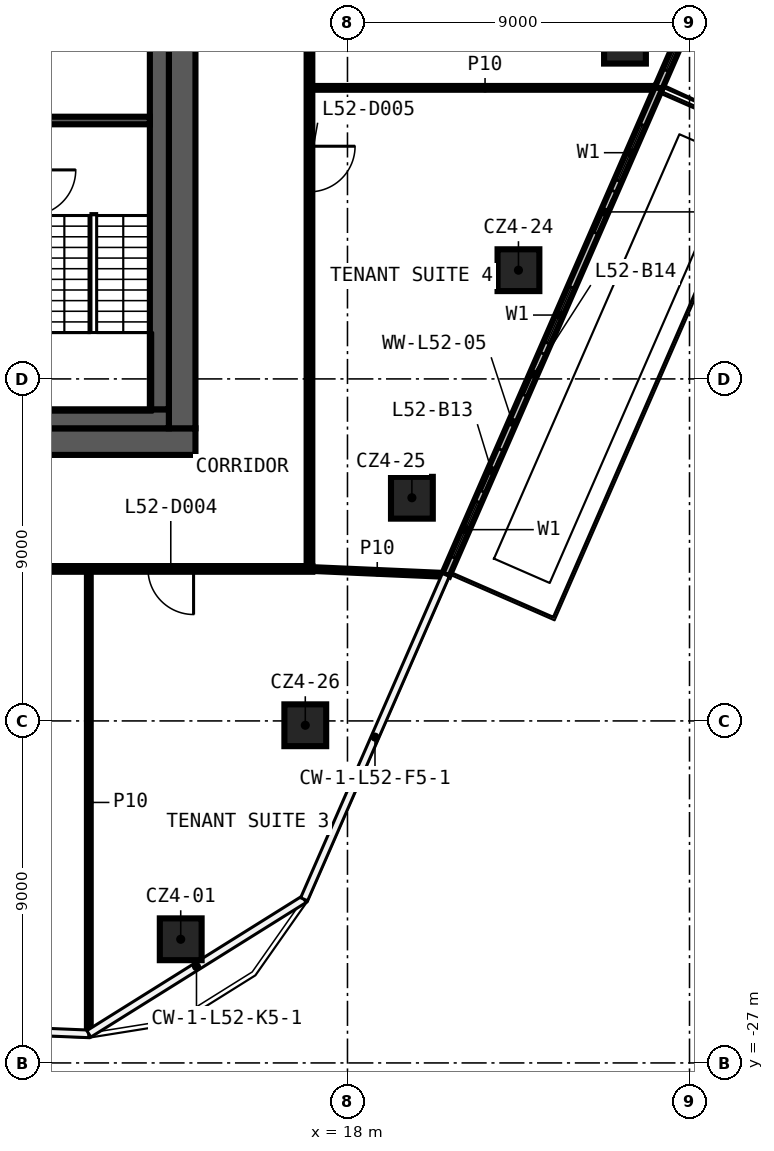
"""IFC4 building model, lengths in metres.
Left out: names, types, materials, properties, quantities, classifications, styles, units other than length and angle.
Written with IfcOpenShell. Run it as: python <this file> out.ifc"""

import sys

from ifc_helpers import new_model, si_unit, direction, frame, frame_2d, origin, origin_2d, place, context, subcontext, project, spatial, rectangle, extrude, element, fill, save


model = new_model("IFC4")
c1 = context("Model", 3, precision=1e-05, world=origin(), true_north=direction((0.0, 1.0)))
c2 = subcontext(c1, "Body", "Model", "MODEL_VIEW")
j1 = project(units=[si_unit("LENGTHUNIT", "METRE"), si_unit("PLANEANGLEUNIT", "RADIAN")], contexts=[c1])
p1 = place(None, origin())
s1 = spatial("IfcSite", under=j1, at=p1, CompositionType="ELEMENT")
p2 = place(p1, origin())
s2 = spatial("IfcBuilding", under=s1, at=p2, CompositionType="ELEMENT")
p3 = place(p2, frame((0.0, 0.0, 249.6)))
s3 = spatial("IfcBuildingStorey", under=s2, at=p3, CompositionType="ELEMENT", Elevation=249.6)
for number, where, z_axis, x_axis in (
    (1, (13.612, -23.746, 0.0), (0.0, 0.0, 1.0), (1.0, 0.0, 0.0)),
    (2, (25.302, -0.152, 0.0), (0.0, 0.0, 1.0), (1.0, 0.0, 0.0)),
    (3, (22.499, -6.139, 0.0), (0.0, 0.0, 1.0), (1.0, 0.0, 0.0)),
    (4, (19.695, -12.127, 0.0), (0.0, 0.0, 1.0), (1.0, 0.0, 0.0)),
    (5, (16.89, -18.114, 0.0), (0.0, 0.0, 1.0), (1.0, 0.0, 0.0)),
):
    element("IfcColumn", number, at=place(p3, frame(where, z_axis=z_axis, x_axis=x_axis)), inside=s3, PredefinedType="COLUMN", context=c2, shape_type="SweptSolid", body=[
        extrude(rectangle(XDim=1.1, YDim=1.1, at=origin_2d()), origin(), (0.0, 0.0, 1.0), 3.82),
    ])
p4 = place(p3, frame((17.075, -14.0, 0.0), z_axis=(0.0, 0.0, 1.0), x_axis=(-1.0, 0.0, 0.0)))
e6 = element("IfcWall", 6, at=p4, inside=s3, PredefinedType="PARTITIONING", context=c2, shape_type="SweptSolid", body=[
    extrude(rectangle(XDim=26.15, YDim=0.15, at=frame_2d((13.075, 0.0))), origin(), (0.0, 0.0, 1.0), 3.82),
])
p5 = place(p4, frame((23.476, 0.0, 0.0)))
e7 = element("IfcOpeningElement", 7, at=p5, cuts=e6, PredefinedType="OPENING", context=c2, shape_type="SweptSolid", body=[
    extrude(rectangle(XDim=1.2, YDim=2.1, at=frame_2d((0.6, 1.05))), frame((0.0, 0.085, 0.0), z_axis=(0.0, -1.0, 0.0), x_axis=(1.0, 0.0, 0.0)), (0.0, 0.0, 1.0), 0.17),
])
p6 = place(p4, frame((19.452, 0.0, 0.0)))
e8 = element("IfcOpeningElement", 8, at=p6, cuts=e6, PredefinedType="OPENING", context=c2, shape_type="SweptSolid", body=[
    extrude(rectangle(XDim=1.2, YDim=2.1, at=frame_2d((0.6, 1.05))), frame((0.0, 0.085, 0.0), z_axis=(0.0, -1.0, 0.0), x_axis=(1.0, 0.0, 0.0)), (0.0, 0.0, 1.0), 0.17),
])
p7 = place(p4, frame((11.351, 0.0, 0.0)))
e9 = element("IfcOpeningElement", 9, at=p7, cuts=e6, PredefinedType="OPENING", context=c2, shape_type="SweptSolid", body=[
    extrude(rectangle(XDim=1.2, YDim=2.1, at=frame_2d((0.6, 1.05))), frame((0.0, 0.085, 0.0), z_axis=(0.0, -1.0, 0.0), x_axis=(1.0, 0.0, 0.0)), (0.0, 0.0, 1.0), 0.17),
])
p8 = place(p4, frame((3.125, 0.0, 0.0)))
e10 = element("IfcOpeningElement", 10, at=p8, cuts=e6, PredefinedType="OPENING", context=c2, shape_type="SweptSolid", body=[
    extrude(rectangle(XDim=1.2, YDim=2.1, at=frame_2d((0.6, 1.05))), frame((0.0, 0.085, 0.0), z_axis=(0.0, -1.0, 0.0), x_axis=(1.0, 0.0, 0.0)), (0.0, 0.0, 1.0), 0.17),
])
p9 = place(p3, frame((17.075, -1.341, 0.0), z_axis=(0.0, 0.0, 1.0), x_axis=(1.0, 0.0, 0.0)))
e11 = element("IfcWall", 11, at=p9, inside=s3, PredefinedType="PARTITIONING", context=c2, shape_type="SweptSolid", body=[
    extrude(rectangle(XDim=9.09, YDim=0.1, at=frame_2d((4.545, 0.0))), origin(), (0.0, 0.0, 1.0), 3.82),
])
p10 = place(p3, frame((17.0, 13.925, 0.0), z_axis=(0.0, 0.0, 1.0), x_axis=(0.0, -1.0, 0.0)))
e12 = element("IfcWall", 12, at=p10, inside=s3, PredefinedType="PARTITIONING", context=c2, shape_type="SweptSolid", body=[
    extrude(rectangle(XDim=27.85, YDim=0.15, at=frame_2d((13.925, 0.0))), origin(), (0.0, 0.0, 1.0), 3.82),
])
p11 = place(p10, frame((16.802, 0.0, 0.0)))
e13 = element("IfcOpeningElement", 13, at=p11, cuts=e12, PredefinedType="OPENING", context=c2, shape_type="SweptSolid", body=[
    extrude(rectangle(XDim=1.2, YDim=2.1, at=frame_2d((0.6, 1.05))), frame((0.0, 0.085, 0.0), z_axis=(0.0, -1.0, 0.0), x_axis=(1.0, 0.0, 0.0)), (0.0, 0.0, 1.0), 0.17),
])
p12 = place(p10, frame((12.534, 0.0, 0.0)))
e14 = element("IfcOpeningElement", 14, at=p12, cuts=e12, PredefinedType="OPENING", context=c2, shape_type="SweptSolid", body=[
    extrude(rectangle(XDim=1.2, YDim=2.1, at=frame_2d((0.6, 1.05))), frame((0.0, 0.085, 0.0), z_axis=(0.0, -1.0, 0.0), x_axis=(1.0, 0.0, 0.0)), (0.0, 0.0, 1.0), 0.17),
])
p13 = place(p3, frame((11.194, -26.215, 0.0), z_axis=(0.0, 0.0, 1.0), x_axis=(0.0, 1.0, 0.0)))
e15 = element("IfcWall", 15, at=p13, inside=s3, PredefinedType="PARTITIONING", context=c2, shape_type="SweptSolid", body=[
    extrude(rectangle(XDim=12.14, YDim=0.1, at=frame_2d((6.07, 0.0))), origin(), (0.0, 0.0, 1.0), 3.82),
])
p14 = place(p3, frame((17.0, -14.0, 0.0), z_axis=(0.0, 0.0, 1.0), x_axis=(0.99903279054, -0.043971393272, 0.0)))
e16 = element("IfcWall", 16, at=p14, inside=s3, PredefinedType="PARTITIONING", context=c2, shape_type="SweptSolid", body=[
    extrude(rectangle(XDim=3.57, YDim=0.1, at=frame_2d((1.785, 0.0))), origin(), (0.0, 0.0, 1.0), 3.82),
])
p15 = place(p3, frame((20.588, -14.158, 0.0), z_axis=(0.0, 0.0, 1.0), x_axis=(0.400286749381, 0.916389937892, 0.0)))
e17 = element("IfcWall", 17, at=p15, inside=s3, PredefinedType="SOLIDWALL", context=c2, shape_type="SweptSolid", body=[
    extrude(rectangle(XDim=13.987, YDim=0.2, at=frame_2d((6.993, 0.0))), origin(), (0.0, 0.0, 1.0), 3.82),
])
p16 = place(p15, frame((0.5, 0.0, 0.6)))
e18 = element("IfcOpeningElement", 18, at=p16, cuts=e17, PredefinedType="OPENING", context=c2, shape_type="SweptSolid", body=[
    extrude(rectangle(XDim=1.6, YDim=2.4, at=frame_2d((0.8, 1.2))), frame((0.0, 0.11, 0.0), z_axis=(0.0, -1.0, 0.0), x_axis=(1.0, 0.0, 0.0)), (0.0, 0.0, 1.0), 0.22),
])
p17 = place(p15, frame((2.4, 0.0, 0.0)))
e19 = element("IfcOpeningElement", 19, at=p17, cuts=e17, PredefinedType="OPENING", context=c2, shape_type="SweptSolid", body=[
    extrude(rectangle(XDim=1.2, YDim=2.4, at=frame_2d((0.6, 1.2))), frame((0.0, 0.11, 0.0), z_axis=(0.0, -1.0, 0.0), x_axis=(1.0, 0.0, 0.0)), (0.0, 0.0, 1.0), 0.22),
])
p18 = place(p15, frame((6.662, 0.0, 0.6)))
e20 = element("IfcOpeningElement", 20, at=p18, cuts=e17, PredefinedType="OPENING", context=c2, shape_type="SweptSolid", body=[
    extrude(rectangle(XDim=1.6, YDim=2.4, at=frame_2d((0.8, 1.2))), frame((0.0, 0.11, 0.0), z_axis=(0.0, -1.0, 0.0), x_axis=(1.0, 0.0, 0.0)), (0.0, 0.0, 1.0), 0.22),
])
p19 = place(p15, frame((5.162, 0.0, 0.0)))
e21 = element("IfcOpeningElement", 21, at=p19, cuts=e17, PredefinedType="OPENING", context=c2, shape_type="SweptSolid", body=[
    extrude(rectangle(XDim=1.2, YDim=2.4, at=frame_2d((0.6, 1.2))), frame((0.0, 0.11, 0.0), z_axis=(0.0, -1.0, 0.0), x_axis=(1.0, 0.0, 0.0)), (0.0, 0.0, 1.0), 0.22),
])
p20 = place(p15, frame((11.324, 0.0, 0.6)))
e22 = element("IfcOpeningElement", 22, at=p20, cuts=e17, PredefinedType="OPENING", context=c2, shape_type="SweptSolid", body=[
    extrude(rectangle(XDim=1.6, YDim=2.4, at=frame_2d((0.8, 1.2))), frame((0.0, 0.11, 0.0), z_axis=(0.0, -1.0, 0.0), x_axis=(1.0, 0.0, 0.0)), (0.0, 0.0, 1.0), 0.22),
])
p21 = place(p15, frame((9.824, 0.0, 0.0)))
e23 = element("IfcOpeningElement", 23, at=p21, cuts=e17, PredefinedType="OPENING", context=c2, shape_type="SweptSolid", body=[
    extrude(rectangle(XDim=1.2, YDim=2.4, at=frame_2d((0.6, 1.2))), frame((0.0, 0.11, 0.0), z_axis=(0.0, -1.0, 0.0), x_axis=(1.0, 0.0, 0.0)), (0.0, 0.0, 1.0), 0.22),
])
p22 = place(p3, frame((26.187, -1.341, 0.0), z_axis=(0.0, 0.0, 1.0), x_axis=(0.400293036608, 0.916387191553, 0.0)))
e24 = element("IfcWall", 24, at=p22, inside=s3, PredefinedType="SOLIDWALL", context=c2, shape_type="SweptSolid", body=[
    extrude(rectangle(XDim=4.653, YDim=0.2, at=frame_2d((2.327, 0.0))), origin(), (0.0, 0.0, 1.0), 3.82),
])
p23 = place(p22, frame((0.5, 0.0, 0.6)))
e25 = element("IfcOpeningElement", 25, at=p23, cuts=e24, PredefinedType="OPENING", context=c2, shape_type="SweptSolid", body=[
    extrude(rectangle(XDim=1.6, YDim=2.4, at=frame_2d((0.8, 1.2))), frame((0.0, 0.11, 0.0), z_axis=(0.0, -1.0, 0.0), x_axis=(1.0, 0.0, 0.0)), (0.0, 0.0, 1.0), 0.22),
])
p24 = place(p22, frame((2.4, 0.0, 0.0)))
e26 = element("IfcOpeningElement", 26, at=p24, cuts=e24, PredefinedType="OPENING", context=c2, shape_type="SweptSolid", body=[
    extrude(rectangle(XDim=1.2, YDim=2.4, at=frame_2d((0.6, 1.2))), frame((0.0, 0.11, 0.0), z_axis=(0.0, -1.0, 0.0), x_axis=(1.0, 0.0, 0.0)), (0.0, 0.0, 1.0), 0.22),
])
p25 = place(p3, frame((14.0, -10.65, 0.0), z_axis=(0.0, 0.0, 1.0), x_axis=(-1.0, 0.0, 0.0)))
e27 = element("IfcWall", 27, at=p25, inside=s3, PredefinedType="SHEAR", context=c2, shape_type="SweptSolid", body=[
    extrude(rectangle(XDim=28.0, YDim=0.7, at=frame_2d((14.0, 0.0))), origin(), (0.0, 0.0, 1.0), 3.82),
])
p26 = place(p25, frame((5.1, 0.0, 0.0)))
e28 = element("IfcOpeningElement", 28, at=p26, cuts=e27, PredefinedType="OPENING", context=c2, shape_type="SweptSolid", body=[
    extrude(rectangle(XDim=1.6, YDim=2.1, at=frame_2d((0.8, 1.05))), frame((0.0, 0.36, 0.0), z_axis=(0.0, -1.0, 0.0), x_axis=(1.0, 0.0, 0.0)), (0.0, 0.0, 1.0), 0.72),
])
p27 = place(p3, frame((13.65, 10.3, 0.0), z_axis=(0.0, 0.0, 1.0), x_axis=(0.0, -1.0, 0.0)))
e29 = element("IfcWall", 29, at=p27, inside=s3, PredefinedType="SHEAR", context=c2, shape_type="SweptSolid", body=[
    extrude(rectangle(XDim=20.6, YDim=0.7, at=frame_2d((10.3, 0.0))), origin(), (0.0, 0.0, 1.0), 3.82),
])
p28 = place(p3, frame((13.3, -10.05, 0.0), z_axis=(0.0, 0.0, 1.0), x_axis=(-1.0, 0.0, 0.0)))
e30 = element("IfcWall", 30, at=p28, inside=s3, PredefinedType="SHEAR", context=c2, shape_type="SweptSolid", body=[
    extrude(rectangle(XDim=4.0, YDim=0.5, at=frame_2d((2.0, 0.0))), origin(), (0.0, 0.0, 1.0), 3.82),
])
p29 = place(p3, frame((13.05, 9.8, 0.0), z_axis=(0.0, 0.0, 1.0), x_axis=(0.0, -1.0, 0.0)))
e31 = element("IfcWall", 31, at=p29, inside=s3, PredefinedType="SHEAR", context=c2, shape_type="SweptSolid", body=[
    extrude(rectangle(XDim=19.6, YDim=0.5, at=frame_2d((9.8, 0.0))), origin(), (0.0, 0.0, 1.0), 3.82),
])
p30 = place(p3, frame((9.45, -2.2, 0.0), z_axis=(0.0, 0.0, 1.0), x_axis=(1.0, 0.0, 0.0)))
e32 = element("IfcWall", 32, at=p30, inside=s3, PredefinedType="SHEAR", context=c2, shape_type="SweptSolid", body=[
    extrude(rectangle(XDim=3.35, YDim=0.2, at=frame_2d((1.675, 0.0))), origin(), (0.0, 0.0, 1.0), 3.82),
])
p31 = place(p8, origin())
e33 = element("IfcDoor", 33, at=p31, inside=s3, OperationType="SINGLE_SWING_LEFT", PredefinedType="DOOR", context=c2, shape_type="SweptSolid", body=[
    extrude(rectangle(XDim=1.2, YDim=2.1, at=frame_2d((0.6, 1.05))), frame((0.0, 0.025, 0.0), z_axis=(0.0, -1.0, 0.0), x_axis=(1.0, 0.0, 0.0)), (0.0, 0.0, 1.0), 0.05),
])
fill(e10, e33)
p32 = place(p11, origin())
e34 = element("IfcDoor", 34, at=p32, inside=s3, OperationType="SINGLE_SWING_RIGHT", PredefinedType="DOOR", context=c2, shape_type="SweptSolid", body=[
    extrude(rectangle(XDim=1.2, YDim=2.1, at=frame_2d((0.6, 1.05))), frame((0.0, 0.025, 0.0), z_axis=(0.0, -1.0, 0.0), x_axis=(1.0, 0.0, 0.0)), (0.0, 0.0, 1.0), 0.05),
])
fill(e13, e34)
p33 = place(p16, origin())
e35 = element("IfcWindow", 35, at=p33, inside=s3, PartitioningType="SINGLE_PANEL", PredefinedType="WINDOW", context=c2, shape_type="SweptSolid", body=[
    extrude(rectangle(XDim=1.6, YDim=2.4, at=frame_2d((0.8, 1.2))), frame((0.0, 0.03, 0.0), z_axis=(0.0, -1.0, 0.0), x_axis=(1.0, 0.0, 0.0)), (0.0, 0.0, 1.0), 0.06),
])
fill(e18, e35)
p34 = place(p17, origin())
e36 = element("IfcDoor", 36, at=p34, inside=s3, OperationType="SLIDING_TO_LEFT", PredefinedType="DOOR", context=c2, shape_type="SweptSolid", body=[
    extrude(rectangle(XDim=1.2, YDim=2.4, at=frame_2d((0.6, 1.2))), frame((0.0, 0.025, 0.0), z_axis=(0.0, -1.0, 0.0), x_axis=(1.0, 0.0, 0.0)), (0.0, 0.0, 1.0), 0.05),
])
fill(e19, e36)
p35 = place(p18, origin())
e37 = element("IfcWindow", 37, at=p35, inside=s3, PartitioningType="SINGLE_PANEL", PredefinedType="WINDOW", context=c2, shape_type="SweptSolid", body=[
    extrude(rectangle(XDim=1.6, YDim=2.4, at=frame_2d((0.8, 1.2))), frame((0.0, 0.03, 0.0), z_axis=(0.0, -1.0, 0.0), x_axis=(1.0, 0.0, 0.0)), (0.0, 0.0, 1.0), 0.06),
])
fill(e20, e37)
p36 = place(p19, origin())
e38 = element("IfcDoor", 38, at=p36, inside=s3, OperationType="SLIDING_TO_LEFT", PredefinedType="DOOR", context=c2, shape_type="SweptSolid", body=[
    extrude(rectangle(XDim=1.2, YDim=2.4, at=frame_2d((0.6, 1.2))), frame((0.0, 0.025, 0.0), z_axis=(0.0, -1.0, 0.0), x_axis=(1.0, 0.0, 0.0)), (0.0, 0.0, 1.0), 0.05),
])
fill(e21, e38)
p37 = place(p20, origin())
e39 = element("IfcWindow", 39, at=p37, inside=s3, PartitioningType="SINGLE_PANEL", PredefinedType="WINDOW", context=c2, shape_type="SweptSolid", body=[
    extrude(rectangle(XDim=1.6, YDim=2.4, at=frame_2d((0.8, 1.2))), frame((0.0, 0.03, 0.0), z_axis=(0.0, -1.0, 0.0), x_axis=(1.0, 0.0, 0.0)), (0.0, 0.0, 1.0), 0.06),
])
fill(e22, e39)
p38 = place(p21, origin())
e40 = element("IfcDoor", 40, at=p38, inside=s3, OperationType="SLIDING_TO_LEFT", PredefinedType="DOOR", context=c2, shape_type="SweptSolid", body=[
    extrude(rectangle(XDim=1.2, YDim=2.4, at=frame_2d((0.6, 1.2))), frame((0.0, 0.025, 0.0), z_axis=(0.0, -1.0, 0.0), x_axis=(1.0, 0.0, 0.0)), (0.0, 0.0, 1.0), 0.05),
])
fill(e23, e40)
p39 = place(p23, origin())
e41 = element("IfcWindow", 41, at=p39, inside=s3, PartitioningType="SINGLE_PANEL", PredefinedType="WINDOW", context=c2, shape_type="SweptSolid", body=[
    extrude(rectangle(XDim=1.6, YDim=2.4, at=frame_2d((0.8, 1.2))), frame((0.0, 0.03, 0.0), z_axis=(0.0, -1.0, 0.0), x_axis=(1.0, 0.0, 0.0)), (0.0, 0.0, 1.0), 0.06),
])
fill(e25, e41)
save(model, sys.argv[1])
